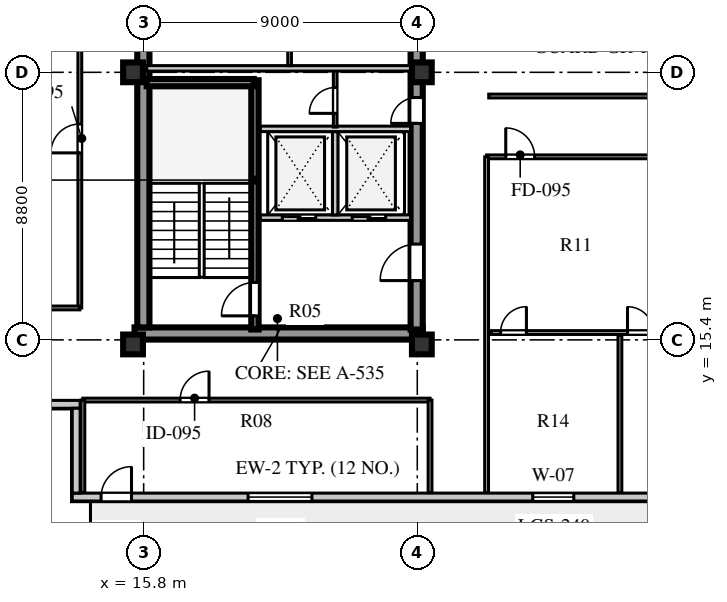
"""IFC4 building model, lengths in metres.
Left out: names, types, materials, properties, quantities, classifications, styles, units other than length and angle.
Written with IfcOpenShell. Run it as: python <this file> out.ifc"""

import sys

from ifc_helpers import new_model, si_unit, direction, frame, frame_2d, origin, origin_2d, place, context, subcontext, project, spatial, rectangle, extrude, element, fill, save


model = new_model("IFC4")
c1 = context("Model", 3, precision=1e-05, world=origin(), true_north=direction((0.0, 1.0)))
c2 = subcontext(c1, "Body", "Model", "MODEL_VIEW")
j1 = project(units=[si_unit("LENGTHUNIT", "METRE"), si_unit("PLANEANGLEUNIT", "RADIAN")], contexts=[c1])
p1 = place(None, origin())
s1 = spatial("IfcSite", under=j1, at=p1, CompositionType="ELEMENT")
p2 = place(p1, origin())
s2 = spatial("IfcBuilding", under=s1, at=p2, CompositionType="ELEMENT")
p3 = place(p2, frame((0.0, 0.0, 272.6)))
s3 = spatial("IfcBuildingStorey", under=s2, at=p3, CompositionType="ELEMENT", Elevation=272.6)
p4 = place(p3, frame((15.5, 15.61, 0.0), z_axis=(0.0, 0.0, 1.0), x_axis=(1.0, 0.0, 0.0)))
e1 = element("IfcWall", 1, at=p4, inside=s3, PredefinedType="SHEAR", context=c2, shape_type="SweptSolid", body=[
    extrude(rectangle(XDim=9.48, YDim=0.4, at=frame_2d((4.74, 0.0))), origin(), (0.0, 0.0, 1.0), 3.66),
])
p5 = place(p3, frame((15.79, 15.81, 0.0), z_axis=(0.0, 0.0, 1.0), x_axis=(0.0, 1.0, 0.0)))
e2 = element("IfcWall", 2, at=p5, inside=s3, PredefinedType="SHEAR", context=c2, shape_type="SweptSolid", body=[
    extrude(rectangle(XDim=25.63, YDim=0.4, at=frame_2d((12.815, 0.0))), origin(), (0.0, 0.0, 1.0), 3.66),
])
p6 = place(p3, frame((24.78, 15.74, 0.0), z_axis=(0.0, 0.0, 1.0), x_axis=(0.0, 1.0, 0.0)))
e3 = element("IfcWall", 3, at=p6, inside=s3, PredefinedType="SHEAR", context=c2, shape_type="SweptSolid", body=[
    extrude(rectangle(XDim=25.76, YDim=0.4, at=frame_2d((12.88, 0.0))), origin(), (0.0, 0.0, 1.0), 3.66),
])
p7 = place(p6, frame((1.61, 0.0, 0.0)))
e4 = element("IfcOpeningElement", 4, at=p7, cuts=e3, PredefinedType="OPENING", context=c2, shape_type="SweptSolid", body=[
    extrude(rectangle(XDim=1.2, YDim=2.1, at=frame_2d((0.6, 1.05))), frame((0.0, 0.21, 0.0), z_axis=(0.0, -1.0, 0.0), x_axis=(1.0, 0.0, 0.0)), (0.0, 0.0, 1.0), 0.42),
])
p8 = place(p6, frame((6.78, 0.0, 0.0)))
e5 = element("IfcOpeningElement", 5, at=p8, cuts=e3, PredefinedType="OPENING", context=c2, shape_type="SweptSolid", body=[
    extrude(rectangle(XDim=0.85, YDim=2.06, at=frame_2d((0.425, 1.03))), frame((0.0, 0.21, 0.0), z_axis=(0.0, -1.0, 0.0), x_axis=(1.0, 0.0, 0.0)), (0.0, 0.0, 1.0), 0.42),
])
p9 = place(p6, frame((12.11, 0.0, 0.0)))
e6 = element("IfcOpeningElement", 6, at=p9, cuts=e3, PredefinedType="OPENING", context=c2, shape_type="SweptSolid", body=[
    extrude(rectangle(XDim=1.5, YDim=2.12, at=frame_2d((0.75, 1.06))), frame((0.0, 0.21, 0.0), z_axis=(0.0, -1.0, 0.0), x_axis=(1.0, 0.0, 0.0)), (0.0, 0.0, 1.0), 0.42),
])
p10 = place(p6, frame((20.11, 0.0, 0.0)))
e7 = element("IfcOpeningElement", 7, at=p10, cuts=e3, PredefinedType="OPENING", context=c2, shape_type="SweptSolid", body=[
    extrude(rectangle(XDim=1.2, YDim=2.12, at=frame_2d((0.6, 1.06))), frame((0.0, 0.21, 0.0), z_axis=(0.0, -1.0, 0.0), x_axis=(1.0, 0.0, 0.0)), (0.0, 0.0, 1.0), 0.42),
])
p11 = place(p6, frame((24.01, 0.0, 0.0)))
e8 = element("IfcOpeningElement", 8, at=p11, cuts=e3, PredefinedType="OPENING", context=c2, shape_type="SweptSolid", body=[
    extrude(rectangle(XDim=0.95, YDim=2.1, at=frame_2d((0.475, 1.05))), frame((0.0, 0.21, 0.0), z_axis=(0.0, -1.0, 0.0), x_axis=(1.0, 0.0, 0.0)), (0.0, 0.0, 1.0), 0.42),
])
for number, where, z_axis, x_axis in (
    (9, (15.45, 15.25, 0.0), (0.0, 0.0, 1.0), (1.0, 0.0, 0.0)),
    (10, (15.45, 24.2, 0.0), (0.0, 0.0, 1.0), (1.0, 0.0, 0.0)),
    (11, (24.95, 15.25, 0.0), (0.0, 0.0, 1.0), (1.0, 0.0, 0.0)),
    (12, (24.95, 24.2, 0.0), (0.0, 0.0, 1.0), (1.0, 0.0, 0.0)),
):
    element("IfcColumn", number, at=place(p3, frame(where, z_axis=z_axis, x_axis=x_axis)), inside=s3, PredefinedType="COLUMN", context=c2, shape_type="SweptSolid", body=[
        extrude(rectangle(XDim=0.65, YDim=0.65, at=origin_2d()), origin(), (0.0, 0.0, 1.0), 3.66),
    ])
p12 = place(p3, frame((13.45, 10.23, 0.0), z_axis=(0.0, 0.0, 1.0), x_axis=(1.0, 0.0, 0.0)))
e13 = element("IfcWall", 13, at=p12, inside=s3, PredefinedType="SOLIDWALL", context=c2, shape_type="SweptSolid", body=[
    extrude(rectangle(XDim=31.7, YDim=0.26, at=frame_2d((15.85, 0.0))), origin(), (0.0, 0.0, 1.0), 3.66),
])
p13 = place(p12, frame((0.95, 0.0, 0.0)))
e14 = element("IfcOpeningElement", 14, at=p13, cuts=e13, PredefinedType="OPENING", context=c2, shape_type="SweptSolid", body=[
    extrude(rectangle(XDim=1.0, YDim=2.05, at=frame_2d((0.5, 1.025))), frame((0.0, 0.14, 0.0), z_axis=(0.0, -1.0, 0.0), x_axis=(1.0, 0.0, 0.0)), (0.0, 0.0, 1.0), 0.28),
])
p14 = place(p12, frame((5.785, 0.0, 0.8)))
e15 = element("IfcOpeningElement", 15, at=p14, cuts=e13, PredefinedType="OPENING", context=c2, shape_type="SweptSolid", body=[
    extrude(rectangle(XDim=2.1, YDim=1.95, at=frame_2d((1.05, 0.975))), frame((0.0, 0.14, 0.0), z_axis=(0.0, -1.0, 0.0), x_axis=(1.0, 0.0, 0.0)), (0.0, 0.0, 1.0), 0.28),
])
p15 = place(p12, frame((15.148, 0.0, 0.8)))
e16 = element("IfcOpeningElement", 16, at=p15, cuts=e13, PredefinedType="OPENING", context=c2, shape_type="SweptSolid", body=[
    extrude(rectangle(XDim=1.35, YDim=1.9, at=frame_2d((0.675, 0.95))), frame((0.0, 0.14, 0.0), z_axis=(0.0, -1.0, 0.0), x_axis=(1.0, 0.0, 0.0)), (0.0, 0.0, 1.0), 0.28),
])
p16 = place(p12, frame((21.033, 0.0, 0.8)))
e17 = element("IfcOpeningElement", 17, at=p16, cuts=e13, PredefinedType="OPENING", context=c2, shape_type="SweptSolid", body=[
    extrude(rectangle(XDim=1.65, YDim=1.95, at=frame_2d((0.825, 0.975))), frame((0.0, 0.14, 0.0), z_axis=(0.0, -1.0, 0.0), x_axis=(1.0, 0.0, 0.0)), (0.0, 0.0, 1.0), 0.28),
])
p17 = place(p12, frame((27.67, 0.0, 0.8)))
e18 = element("IfcOpeningElement", 18, at=p17, cuts=e13, PredefinedType="OPENING", context=c2, shape_type="SweptSolid", body=[
    extrude(rectangle(XDim=1.95, YDim=2.0, at=frame_2d((0.975, 1.0))), frame((0.0, 0.14, 0.0), z_axis=(0.0, -1.0, 0.0), x_axis=(1.0, 0.0, 0.0)), (0.0, 0.0, 1.0), 0.28),
])
p18 = place(p3, frame((10.4, 13.28, 0.0), z_axis=(0.0, 0.0, 1.0), x_axis=(1.0, 0.0, 0.0)))
e19 = element("IfcWall", 19, at=p18, inside=s3, PredefinedType="SOLIDWALL", context=c2, shape_type="SweptSolid", body=[
    extrude(rectangle(XDim=3.31, YDim=0.26, at=frame_2d((1.655, 0.0))), origin(), (0.0, 0.0, 1.0), 3.66),
])
p19 = place(p3, frame((13.58, 13.15, 0.0), z_axis=(0.0, 0.0, 1.0), x_axis=(0.0, -1.0, 0.0)))
e20 = element("IfcWall", 20, at=p19, inside=s3, PredefinedType="SOLIDWALL", context=c2, shape_type="SweptSolid", body=[
    extrude(rectangle(XDim=2.79, YDim=0.26, at=frame_2d((1.395, 0.0))), origin(), (0.0, 0.0, 1.0), 3.66),
])
p20 = place(p3, frame((19.46, 15.74, 0.0), z_axis=(0.0, 0.0, 1.0), x_axis=(0.0, 1.0, 0.0)))
e21 = element("IfcWall", 21, at=p20, inside=s3, PredefinedType="SHEAR", context=c2, shape_type="SweptSolid", body=[
    extrude(rectangle(XDim=8.2, YDim=0.24, at=frame_2d((4.1, 0.0))), origin(), (0.0, 0.0, 1.0), 3.9),
])
p21 = place(p20, frame((0.45, 0.0, 0.0)))
e22 = element("IfcOpeningElement", 22, at=p21, cuts=e21, PredefinedType="OPENING", context=c2, shape_type="SweptSolid", body=[
    extrude(rectangle(XDim=1.1, YDim=2.1, at=frame_2d((0.55, 1.05))), frame((0.0, 0.13, 0.0), z_axis=(0.0, -1.0, 0.0), x_axis=(1.0, 0.0, 0.0)), (0.0, 0.0, 1.0), 0.26),
])
p22 = place(p3, frame((15.9, 23.86, 0.0), z_axis=(0.0, 0.0, 1.0), x_axis=(1.0, 0.0, 0.0)))
e23 = element("IfcWall", 23, at=p22, inside=s3, PredefinedType="SHEAR", context=c2, shape_type="SweptSolid", body=[
    extrude(rectangle(XDim=3.52, YDim=0.24, at=frame_2d((1.76, 0.0))), origin(), (0.0, 0.0, 1.0), 3.9),
])
p23 = place(p3, frame((19.64, 19.42, 0.0), z_axis=(0.0, 0.0, 1.0), x_axis=(1.0, 0.0, 0.0)))
e24 = element("IfcWall", 24, at=p23, inside=s3, PredefinedType="SOLIDWALL", context=c2, shape_type="SweptSolid", body=[
    extrude(rectangle(XDim=4.94, YDim=0.18, at=frame_2d((2.47, 0.0))), origin(), (0.0, 0.0, 1.0), 3.66),
])
p24 = place(p23, frame((0.72, 0.0, 0.0)))
e25 = element("IfcOpeningElement", 25, at=p24, cuts=e24, PredefinedType="OPENING", context=c2, shape_type="SweptSolid", body=[
    extrude(rectangle(XDim=1.1, YDim=2.1, at=frame_2d((0.55, 1.05))), frame((0.0, 0.1, 0.0), z_axis=(0.0, -1.0, 0.0), x_axis=(1.0, 0.0, 0.0)), (0.0, 0.0, 1.0), 0.2),
])
p25 = place(p23, frame((3.02, 0.0, 0.0)))
e26 = element("IfcOpeningElement", 26, at=p25, cuts=e24, PredefinedType="OPENING", context=c2, shape_type="SweptSolid", body=[
    extrude(rectangle(XDim=1.1, YDim=2.1, at=frame_2d((0.55, 1.05))), frame((0.0, 0.1, 0.0), z_axis=(0.0, -1.0, 0.0), x_axis=(1.0, 0.0, 0.0)), (0.0, 0.0, 1.0), 0.2),
])
p26 = place(p3, frame((22.1, 19.51, 0.0), z_axis=(0.0, 0.0, 1.0), x_axis=(0.0, 1.0, 0.0)))
e27 = element("IfcWall", 27, at=p26, inside=s3, PredefinedType="SOLIDWALL", context=c2, shape_type="SweptSolid", body=[
    extrude(rectangle(XDim=2.74, YDim=0.18, at=frame_2d((1.37, 0.0))), origin(), (0.0, 0.0, 1.0), 3.66),
])
p27 = place(p3, frame((19.64, 22.34, 0.0), z_axis=(0.0, 0.0, 1.0), x_axis=(1.0, 0.0, 0.0)))
e28 = element("IfcWall", 28, at=p27, inside=s3, PredefinedType="SOLIDWALL", context=c2, shape_type="SweptSolid", body=[
    extrude(rectangle(XDim=4.94, YDim=0.18, at=frame_2d((2.47, 0.0))), origin(), (0.0, 0.0, 1.0), 3.66),
])
p28 = place(p3, frame((22.1, 22.4, 0.0), z_axis=(0.0, 0.0, 1.0), x_axis=(0.0, 1.0, 0.0)))
e29 = element("IfcWall", 29, at=p28, inside=s3, PredefinedType="PARTITIONING", context=c2, shape_type="SweptSolid", body=[
    extrude(rectangle(XDim=1.88, YDim=0.12, at=frame_2d((0.94, 0.0))), origin(), (0.0, 0.0, 1.0), 3.66),
])
p29 = place(p28, frame((0.45, 0.0, 0.0)))
e30 = element("IfcOpeningElement", 30, at=p29, cuts=e29, PredefinedType="OPENING", context=c2, shape_type="SweptSolid", body=[
    extrude(rectangle(XDim=0.85, YDim=2.06, at=frame_2d((0.425, 1.03))), frame((0.0, 0.07, 0.0), z_axis=(0.0, -1.0, 0.0), x_axis=(1.0, 0.0, 0.0)), (0.0, 0.0, 1.0), 0.14),
])
p30 = place(p3, frame((15.9, 24.33, 0.0), z_axis=(0.0, 0.0, 1.0), x_axis=(1.0, 0.0, 0.0)))
e31 = element("IfcWall", 31, at=p30, inside=s3, PredefinedType="SOLIDWALL", context=c2, shape_type="SweptSolid", body=[
    extrude(rectangle(XDim=8.68, YDim=0.18, at=frame_2d((4.34, 0.0))), origin(), (0.0, 0.0, 1.0), 3.06),
])
p31 = place(p3, frame((20.6, 24.42, 0.0), z_axis=(0.0, 0.0, 1.0), x_axis=(0.0, 1.0, 0.0)))
e32 = element("IfcWall", 32, at=p31, inside=s3, PredefinedType="PARTITIONING", context=c2, shape_type="SweptSolid", body=[
    extrude(rectangle(XDim=2.02, YDim=0.12, at=frame_2d((1.01, 0.0))), origin(), (0.0, 0.0, 1.0), 3.66),
])
p32 = place(p3, frame((27.08, 21.42, 0.0), z_axis=(0.0, 0.0, 1.0), x_axis=(1.0, 0.0, 0.0)))
e33 = element("IfcWall", 33, at=p32, inside=s3, PredefinedType="PLUMBINGWALL", context=c2, shape_type="SweptSolid", body=[
    extrude(rectangle(XDim=12.07, YDim=0.125, at=frame_2d((6.035, 0.0))), origin(), (0.0, 0.0, 1.0), 3.36),
])
p33 = place(p32, frame((0.63, 0.0, 0.0)))
e34 = element("IfcOpeningElement", 34, at=p33, cuts=e33, PredefinedType="OPENING", context=c2, shape_type="SweptSolid", body=[
    extrude(rectangle(XDim=0.95, YDim=2.1, at=frame_2d((0.475, 1.05))), frame((0.0, 0.073, 0.0), z_axis=(0.0, -1.0, 0.0), x_axis=(1.0, 0.0, 0.0)), (0.0, 0.0, 1.0), 0.145),
])
p34 = place(p3, frame((27.08, 10.38, 0.0), z_axis=(0.0, 0.0, 1.0), x_axis=(0.0, 1.0, 0.0)))
e35 = element("IfcWall", 35, at=p34, inside=s3, PredefinedType="PLUMBINGWALL", context=c2, shape_type="SweptSolid", body=[
    extrude(rectangle(XDim=11.04, YDim=0.125, at=frame_2d((5.52, 0.0))), origin(), (0.0, 0.0, 1.0), 3.66),
])
p35 = place(p3, frame((27.15, 23.42, 0.0), z_axis=(0.0, 0.0, 1.0), x_axis=(1.0, 0.0, 0.0)))
e36 = element("IfcWall", 36, at=p35, inside=s3, PredefinedType="PLUMBINGWALL", context=c2, shape_type="SweptSolid", body=[
    extrude(rectangle(XDim=6.0, YDim=0.125, at=frame_2d((3.0, 0.0))), origin(), (0.0, 0.0, 1.0), 3.66),
])
p36 = place(p3, frame((13.8, 13.42, 0.0), z_axis=(0.0, 0.0, 1.0), x_axis=(1.0, 0.0, 0.0)))
e37 = element("IfcWall", 37, at=p36, inside=s3, PredefinedType="PLUMBINGWALL", context=c2, shape_type="SweptSolid", body=[
    extrude(rectangle(XDim=11.42, YDim=0.125, at=frame_2d((5.71, 0.0))), origin(), (0.0, 0.0, 1.0), 3.66),
])
p37 = place(p36, frame((3.2, 0.0, 0.0)))
e38 = element("IfcOpeningElement", 38, at=p37, cuts=e37, PredefinedType="OPENING", context=c2, shape_type="SweptSolid", body=[
    extrude(rectangle(XDim=0.95, YDim=2.08, at=frame_2d((0.475, 1.04))), frame((0.0, 0.073, 0.0), z_axis=(0.0, -1.0, 0.0), x_axis=(1.0, 0.0, 0.0)), (0.0, 0.0, 1.0), 0.145),
])
p38 = place(p3, frame((13.8, 10.38, 0.0), z_axis=(0.0, 0.0, 1.0), x_axis=(0.0, 1.0, 0.0)))
e39 = element("IfcWall", 39, at=p38, inside=s3, PredefinedType="PLUMBINGWALL", context=c2, shape_type="SweptSolid", body=[
    extrude(rectangle(XDim=3.04, YDim=0.125, at=frame_2d((1.52, 0.0))), origin(), (0.0, 0.0, 1.0), 3.66),
])
p39 = place(p3, frame((25.22, 10.38, 0.0), z_axis=(0.0, 0.0, 1.0), x_axis=(0.0, 1.0, 0.0)))
e40 = element("IfcWall", 40, at=p39, inside=s3, PredefinedType="PLUMBINGWALL", context=c2, shape_type="SweptSolid", body=[
    extrude(rectangle(XDim=3.04, YDim=0.125, at=frame_2d((1.52, 0.0))), origin(), (0.0, 0.0, 1.0), 3.21),
])
p40 = place(p3, frame((13.7, 16.45, 0.0), z_axis=(0.0, 0.0, 1.0), x_axis=(0.0, 1.0, 0.0)))
e41 = element("IfcWall", 41, at=p40, inside=s3, PredefinedType="PLUMBINGWALL", context=c2, shape_type="SweptSolid", body=[
    extrude(rectangle(XDim=24.3, YDim=0.125, at=frame_2d((12.15, 0.0))), origin(), (0.0, 0.0, 1.0), 3.66),
])
p41 = place(p40, frame((5.1, 0.0, 0.0)))
e42 = element("IfcOpeningElement", 42, at=p41, cuts=e41, PredefinedType="OPENING", context=c2, shape_type="SweptSolid", body=[
    extrude(rectangle(XDim=0.95, YDim=2.08, at=frame_2d((0.475, 1.04))), frame((0.0, 0.073, 0.0), z_axis=(0.0, -1.0, 0.0), x_axis=(1.0, 0.0, 0.0)), (0.0, 0.0, 1.0), 0.145),
])
p42 = place(p3, frame((10.68, 16.45, 0.0), z_axis=(0.0, 0.0, 1.0), x_axis=(1.0, 0.0, 0.0)))
e43 = element("IfcWall", 43, at=p42, inside=s3, PredefinedType="PLUMBINGWALL", context=c2, shape_type="SweptSolid", body=[
    extrude(rectangle(XDim=3.02, YDim=0.125, at=frame_2d((1.51, 0.0))), origin(), (0.0, 0.0, 1.0), 3.66),
])
p43 = place(p3, frame((27.24, 15.641, 0.0), z_axis=(0.0, 0.0, 1.0), x_axis=(1.0, 0.0, 0.0)))
e44 = element("IfcWall", 44, at=p43, inside=s3, PredefinedType="PLUMBINGWALL", context=c2, shape_type="SweptSolid", body=[
    extrude(rectangle(XDim=11.83, YDim=0.125, at=frame_2d((5.915, 0.0))), origin(), (0.0, 0.0, 1.0), 3.66),
])
p44 = place(p43, frame((0.3, 0.0, 0.0)))
e45 = element("IfcOpeningElement", 45, at=p44, cuts=e44, PredefinedType="OPENING", context=c2, shape_type="SweptSolid", body=[
    extrude(rectangle(XDim=0.85, YDim=2.08, at=frame_2d((0.425, 1.04))), frame((0.0, 0.073, 0.0), z_axis=(0.0, -1.0, 0.0), x_axis=(1.0, 0.0, 0.0)), (0.0, 0.0, 1.0), 0.145),
])
p45 = place(p43, frame((4.475, 0.0, 0.0)))
e46 = element("IfcOpeningElement", 46, at=p45, cuts=e44, PredefinedType="OPENING", context=c2, shape_type="SweptSolid", body=[
    extrude(rectangle(XDim=0.85, YDim=2.08, at=frame_2d((0.425, 1.04))), frame((0.0, 0.073, 0.0), z_axis=(0.0, -1.0, 0.0), x_axis=(1.0, 0.0, 0.0)), (0.0, 0.0, 1.0), 0.145),
])
p46 = place(p3, frame((31.465, 10.38, 0.0), z_axis=(0.0, 0.0, 1.0), x_axis=(0.0, 1.0, 0.0)))
e47 = element("IfcWall", 47, at=p46, inside=s3, PredefinedType="PLUMBINGWALL", context=c2, shape_type="SweptSolid", body=[
    extrude(rectangle(XDim=5.181, YDim=0.125, at=frame_2d((2.591, 0.0))), origin(), (0.0, 0.0, 1.0), 3.66),
])
p47 = place(p13, frame((1.0, 0.0, 0.0), z_axis=(0.0, 0.0, 1.0), x_axis=(-1.0, 0.0, 0.0)))
e48 = element("IfcDoor", 48, at=p47, inside=s3, OperationType="SINGLE_SWING_LEFT", PredefinedType="DOOR", context=c2, shape_type="SweptSolid", body=[
    extrude(rectangle(XDim=1.0, YDim=2.05, at=frame_2d((0.5, 1.025))), frame((0.0, 0.025, 0.0), z_axis=(0.0, -1.0, 0.0), x_axis=(1.0, 0.0, 0.0)), (0.0, 0.0, 1.0), 0.05),
])
fill(e14, e48)
p48 = place(p14, origin())
e49 = element("IfcWindow", 49, at=p48, inside=s3, PartitioningType="SINGLE_PANEL", PredefinedType="WINDOW", context=c2, shape_type="SweptSolid", body=[
    extrude(rectangle(XDim=2.1, YDim=1.95, at=frame_2d((1.05, 0.975))), frame((0.0, 0.03, 0.0), z_axis=(0.0, -1.0, 0.0), x_axis=(1.0, 0.0, 0.0)), (0.0, 0.0, 1.0), 0.06),
])
fill(e15, e49)
p49 = place(p15, origin())
e50 = element("IfcWindow", 50, at=p49, inside=s3, PartitioningType="SINGLE_PANEL", PredefinedType="WINDOW", context=c2, shape_type="SweptSolid", body=[
    extrude(rectangle(XDim=1.35, YDim=1.9, at=frame_2d((0.675, 0.95))), frame((0.0, 0.03, 0.0), z_axis=(0.0, -1.0, 0.0), x_axis=(1.0, 0.0, 0.0)), (0.0, 0.0, 1.0), 0.06),
])
fill(e16, e50)
p50 = place(p21, origin())
e51 = element("IfcDoor", 51, at=p50, inside=s3, OperationType="SINGLE_SWING_LEFT", PredefinedType="DOOR", context=c2, shape_type="SweptSolid", body=[
    extrude(rectangle(XDim=1.1, YDim=2.1, at=frame_2d((0.55, 1.05))), frame((0.0, 0.025, 0.0), z_axis=(0.0, -1.0, 0.0), x_axis=(1.0, 0.0, 0.0)), (0.0, 0.0, 1.0), 0.05),
])
fill(e22, e51)
p51 = place(p24, origin())
e52 = element("IfcDoor", 52, at=p51, inside=s3, OperationType="DOUBLE_DOOR_SLIDING", PredefinedType="DOOR", context=c2, shape_type="SweptSolid", body=[
    extrude(rectangle(XDim=1.1, YDim=2.1, at=frame_2d((0.55, 1.05))), frame((0.0, 0.025, 0.0), z_axis=(0.0, -1.0, 0.0), x_axis=(1.0, 0.0, 0.0)), (0.0, 0.0, 1.0), 0.05),
])
fill(e25, e52)
p52 = place(p25, origin())
e53 = element("IfcDoor", 53, at=p52, inside=s3, OperationType="DOUBLE_DOOR_SLIDING", PredefinedType="DOOR", context=c2, shape_type="SweptSolid", body=[
    extrude(rectangle(XDim=1.1, YDim=2.1, at=frame_2d((0.55, 1.05))), frame((0.0, 0.025, 0.0), z_axis=(0.0, -1.0, 0.0), x_axis=(1.0, 0.0, 0.0)), (0.0, 0.0, 1.0), 0.05),
])
fill(e26, e53)
p53 = place(p7, frame((1.2, 0.0, 0.0), z_axis=(0.0, 0.0, 1.0), x_axis=(-1.0, 0.0, 0.0)))
e54 = element("IfcDoor", 54, at=p53, inside=s3, OperationType="SINGLE_SWING_RIGHT", PredefinedType="DOOR", context=c2, shape_type="SweptSolid", body=[
    extrude(rectangle(XDim=1.2, YDim=2.1, at=frame_2d((0.6, 1.05))), frame((0.0, 0.025, 0.0), z_axis=(0.0, -1.0, 0.0), x_axis=(1.0, 0.0, 0.0)), (0.0, 0.0, 1.0), 0.05),
])
fill(e4, e54)
p54 = place(p29, origin())
e55 = element("IfcDoor", 55, at=p54, inside=s3, OperationType="SINGLE_SWING_LEFT", PredefinedType="DOOR", context=c2, shape_type="SweptSolid", body=[
    extrude(rectangle(XDim=0.85, YDim=2.06, at=frame_2d((0.425, 1.03))), frame((0.0, 0.025, 0.0), z_axis=(0.0, -1.0, 0.0), x_axis=(1.0, 0.0, 0.0)), (0.0, 0.0, 1.0), 0.05),
])
fill(e30, e55)
p55 = place(p8, frame((0.85, 0.0, 0.0), z_axis=(0.0, 0.0, 1.0), x_axis=(-1.0, 0.0, 0.0)))
e56 = element("IfcDoor", 56, at=p55, inside=s3, OperationType="SINGLE_SWING_RIGHT", PredefinedType="DOOR", context=c2, shape_type="SweptSolid", body=[
    extrude(rectangle(XDim=0.85, YDim=2.06, at=frame_2d((0.425, 1.03))), frame((0.0, 0.025, 0.0), z_axis=(0.0, -1.0, 0.0), x_axis=(1.0, 0.0, 0.0)), (0.0, 0.0, 1.0), 0.05),
])
fill(e5, e56)
p56 = place(p37, frame((0.95, 0.0, 0.0), z_axis=(0.0, 0.0, 1.0), x_axis=(-1.0, 0.0, 0.0)))
e57 = element("IfcDoor", 57, at=p56, inside=s3, OperationType="SINGLE_SWING_LEFT", PredefinedType="DOOR", context=c2, shape_type="SweptSolid", body=[
    extrude(rectangle(XDim=0.95, YDim=2.08, at=frame_2d((0.475, 1.04))), frame((0.0, 0.025, 0.0), z_axis=(0.0, -1.0, 0.0), x_axis=(1.0, 0.0, 0.0)), (0.0, 0.0, 1.0), 0.05),
])
fill(e38, e57)
p57 = place(p41, origin())
e58 = element("IfcDoor", 58, at=p57, inside=s3, OperationType="SINGLE_SWING_LEFT", PredefinedType="DOOR", context=c2, shape_type="SweptSolid", body=[
    extrude(rectangle(XDim=0.95, YDim=2.08, at=frame_2d((0.475, 1.04))), frame((0.0, 0.025, 0.0), z_axis=(0.0, -1.0, 0.0), x_axis=(1.0, 0.0, 0.0)), (0.0, 0.0, 1.0), 0.05),
])
fill(e42, e58)
p58 = place(p44, frame((0.85, 0.0, 0.0), z_axis=(0.0, 0.0, 1.0), x_axis=(-1.0, 0.0, 0.0)))
e59 = element("IfcDoor", 59, at=p58, inside=s3, OperationType="SINGLE_SWING_LEFT", PredefinedType="DOOR", context=c2, shape_type="SweptSolid", body=[
    extrude(rectangle(XDim=0.85, YDim=2.08, at=frame_2d((0.425, 1.04))), frame((0.0, 0.025, 0.0), z_axis=(0.0, -1.0, 0.0), x_axis=(1.0, 0.0, 0.0)), (0.0, 0.0, 1.0), 0.05),
])
fill(e45, e59)
p59 = place(p45, frame((0.85, 0.0, 0.0), z_axis=(0.0, 0.0, 1.0), x_axis=(-1.0, 0.0, 0.0)))
e60 = element("IfcDoor", 60, at=p59, inside=s3, OperationType="SINGLE_SWING_RIGHT", PredefinedType="DOOR", context=c2, shape_type="SweptSolid", body=[
    extrude(rectangle(XDim=0.85, YDim=2.08, at=frame_2d((0.425, 1.04))), frame((0.0, 0.025, 0.0), z_axis=(0.0, -1.0, 0.0), x_axis=(1.0, 0.0, 0.0)), (0.0, 0.0, 1.0), 0.05),
])
fill(e46, e60)
p60 = place(p33, frame((0.95, 0.0, 0.0), z_axis=(0.0, 0.0, 1.0), x_axis=(-1.0, 0.0, 0.0)))
e61 = element("IfcDoor", 61, at=p60, inside=s3, OperationType="SINGLE_SWING_RIGHT", PredefinedType="DOOR", context=c2, shape_type="SweptSolid", body=[
    extrude(rectangle(XDim=0.95, YDim=2.1, at=frame_2d((0.475, 1.05))), frame((0.0, 0.025, 0.0), z_axis=(0.0, -1.0, 0.0), x_axis=(1.0, 0.0, 0.0)), (0.0, 0.0, 1.0), 0.05),
])
fill(e34, e61)
save(model, sys.argv[1])
